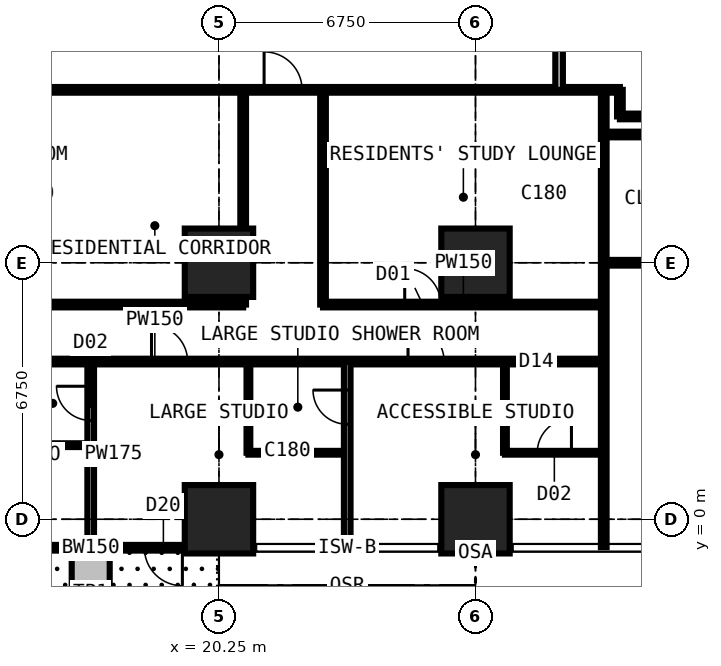
"""IFC4 building model, lengths in metres.
Left out: names, types, materials, properties, quantities, classifications, styles, units other than length and angle.
Written with IfcOpenShell. Run it as: python <this file> out.ifc"""

import sys

from ifc_helpers import new_model, si_unit, direction, frame, frame_2d, origin, origin_2d, place, context, subcontext, project, spatial, rectangle, extrude, element, fill, save


model = new_model("IFC4")
c1 = context("Model", 3, precision=1e-05, world=origin(), true_north=direction((0.0, 1.0)))
c2 = subcontext(c1, "Body", "Model", "MODEL_VIEW")
j1 = project(units=[si_unit("LENGTHUNIT", "METRE"), si_unit("PLANEANGLEUNIT", "RADIAN")], contexts=[c1])
p1 = place(None, origin())
s1 = spatial("IfcSite", under=j1, at=p1, CompositionType="ELEMENT")
p2 = place(p1, origin())
s2 = spatial("IfcBuilding", under=s1, at=p2, CompositionType="ELEMENT")
p3 = place(p2, frame((0.0, 0.0, 94.5)))
s3 = spatial("IfcBuildingStorey", under=s2, at=p3, CompositionType="ELEMENT", Elevation=94.5)
for number, where, z_axis, x_axis in (
    (1, (20.25, 0.0, 0.0), (0.0, 0.0, 1.0), (1.0, 0.0, 0.0)),
    (2, (20.25, 6.75, 0.0), (0.0, 0.0, 1.0), (1.0, 0.0, 0.0)),
    (3, (27.0, 0.0, 0.0), (0.0, 0.0, 1.0), (1.0, 0.0, 0.0)),
    (4, (27.0, 6.75, 0.0), (0.0, 0.0, 1.0), (1.0, 0.0, 0.0)),
):
    element("IfcColumn", number, at=place(p3, frame(where, z_axis=z_axis, x_axis=x_axis)), inside=s3, PredefinedType="COLUMN", context=c2, shape_type="SweptSolid", body=[
        extrude(rectangle(XDim=1.8, YDim=1.8, at=origin_2d()), origin(), (0.0, 0.0, 1.0), 3.6),
    ])
p4 = place(p3, frame((20.25, -0.75, 0.0), z_axis=(0.0, 0.0, 1.0), x_axis=(-1.0, 0.0, 0.0)))
e5 = element("IfcWall", 5, at=p4, inside=s3, PredefinedType="SOLIDWALL", context=c2, shape_type="SweptSolid", body=[
    extrude(rectangle(XDim=6.75, YDim=0.15, at=frame_2d((3.375, 0.0))), origin(), (0.0, 0.0, 1.0), 3.375),
])
p5 = place(p4, frame((0.962, 0.0, 0.0)))
e6 = element("IfcOpeningElement", 6, at=p5, cuts=e5, PredefinedType="OPENING", context=c2, shape_type="SweptSolid", body=[
    extrude(rectangle(XDim=1.0, YDim=2.2, at=frame_2d((0.5, 1.1))), frame((0.0, 0.085, 0.0), z_axis=(0.0, -1.0, 0.0), x_axis=(1.0, 0.0, 0.0)), (0.0, 0.0, 1.0), 0.17),
])
p6 = place(p4, frame((2.025, 0.0, 0.9)))
e7 = element("IfcOpeningElement", 7, at=p6, cuts=e5, PredefinedType="OPENING", context=c2, shape_type="SweptSolid", body=[
    extrude(rectangle(XDim=1.2, YDim=1.8, at=frame_2d((0.6, 0.9))), frame((0.0, 0.085, 0.0), z_axis=(0.0, -1.0, 0.0), x_axis=(1.0, 0.0, 0.0)), (0.0, 0.0, 1.0), 0.17),
])
p7 = place(p4, frame((4.788, 0.0, 0.0)))
e8 = element("IfcOpeningElement", 8, at=p7, cuts=e5, PredefinedType="OPENING", context=c2, shape_type="SweptSolid", body=[
    extrude(rectangle(XDim=1.0, YDim=2.2, at=frame_2d((0.5, 1.1))), frame((0.0, 0.085, 0.0), z_axis=(0.0, -1.0, 0.0), x_axis=(1.0, 0.0, 0.0)), (0.0, 0.0, 1.0), 0.17),
])
p8 = place(p4, frame((3.525, 0.0, 0.9)))
e9 = element("IfcOpeningElement", 9, at=p8, cuts=e5, PredefinedType="OPENING", context=c2, shape_type="SweptSolid", body=[
    extrude(rectangle(XDim=1.2, YDim=1.8, at=frame_2d((0.6, 0.9))), frame((0.0, 0.085, 0.0), z_axis=(0.0, -1.0, 0.0), x_axis=(1.0, 0.0, 0.0)), (0.0, 0.0, 1.0), 0.17),
])
p9 = place(p3, frame((16.875, -0.85, 0.0), z_axis=(0.0, 0.0, 1.0), x_axis=(0.0, -1.0, 0.0)))
e10 = element("IfcWall", 10, at=p9, inside=s3, PredefinedType="USERDEFINED", context=c2, shape_type="SweptSolid", body=[
    extrude(rectangle(XDim=2.2, YDim=1.0, at=frame_2d((1.1, 0.0))), origin(), (0.0, 0.0, 1.0), 0.9),
])
p10 = place(p3, frame((6.75, 4.15, 0.0), z_axis=(0.0, 0.0, 1.0), x_axis=(1.0, 0.0, 0.0)))
e11 = element("IfcWall", 11, at=p10, inside=s3, PredefinedType="PARTITIONING", context=c2, shape_type="SweptSolid", body=[
    extrude(rectangle(XDim=23.625, YDim=0.15, at=frame_2d((11.812, 0.0))), origin(), (0.0, 0.0, 1.0), 3.375),
])
p11 = place(p10, frame((2.85, 0.0, 0.0)))
e12 = element("IfcOpeningElement", 12, at=p11, cuts=e11, PredefinedType="OPENING", context=c2, shape_type="SweptSolid", body=[
    extrude(rectangle(XDim=1.0, YDim=2.2, at=frame_2d((0.5, 1.1))), frame((0.0, 0.085, 0.0), z_axis=(0.0, -1.0, 0.0), x_axis=(1.0, 0.0, 0.0)), (0.0, 0.0, 1.0), 0.17),
])
p12 = place(p10, frame((18.475, 0.0, 0.0)))
e13 = element("IfcOpeningElement", 13, at=p12, cuts=e11, PredefinedType="OPENING", context=c2, shape_type="SweptSolid", body=[
    extrude(rectangle(XDim=0.95, YDim=2.2, at=frame_2d((0.475, 1.1))), frame((0.0, 0.085, 0.0), z_axis=(0.0, -1.0, 0.0), x_axis=(1.0, 0.0, 0.0)), (0.0, 0.0, 1.0), 0.17),
])
p13 = place(p10, frame((11.725, 0.0, 0.0)))
e14 = element("IfcOpeningElement", 14, at=p13, cuts=e11, PredefinedType="OPENING", context=c2, shape_type="SweptSolid", body=[
    extrude(rectangle(XDim=0.95, YDim=2.2, at=frame_2d((0.475, 1.1))), frame((0.0, 0.085, 0.0), z_axis=(0.0, -1.0, 0.0), x_axis=(1.0, 0.0, 0.0)), (0.0, 0.0, 1.0), 0.17),
])
p14 = place(p10, frame((6.95, 0.0, 0.0)))
e15 = element("IfcOpeningElement", 15, at=p14, cuts=e11, PredefinedType="OPENING", context=c2, shape_type="SweptSolid", body=[
    extrude(rectangle(XDim=0.95, YDim=2.2, at=frame_2d((0.475, 1.1))), frame((0.0, 0.085, 0.0), z_axis=(0.0, -1.0, 0.0), x_axis=(1.0, 0.0, 0.0)), (0.0, 0.0, 1.0), 0.17),
])
p15 = place(p3, frame((6.75, 5.65, 0.0), z_axis=(0.0, 0.0, 1.0), x_axis=(1.0, 0.0, 0.0)))
e16 = element("IfcWall", 16, at=p15, inside=s3, PredefinedType="PARTITIONING", context=c2, shape_type="SweptSolid", body=[
    extrude(rectangle(XDim=14.137, YDim=0.15, at=frame_2d((7.069, 0.0))), origin(), (0.0, 0.0, 1.0), 3.375),
])
p16 = place(p15, frame((7.7, 0.0, 0.0)))
e17 = element("IfcOpeningElement", 17, at=p16, cuts=e16, PredefinedType="OPENING", context=c2, shape_type="SweptSolid", body=[
    extrude(rectangle(XDim=0.95, YDim=2.2, at=frame_2d((0.475, 1.1))), frame((0.0, 0.085, 0.0), z_axis=(0.0, -1.0, 0.0), x_axis=(1.0, 0.0, 0.0)), (0.0, 0.0, 1.0), 0.17),
])
p17 = place(p3, frame((10.125, 11.3, 0.0), z_axis=(0.0, 0.0, 1.0), x_axis=(1.0, 0.0, 0.0)))
e18 = element("IfcWall", 18, at=p17, inside=s3, PredefinedType="PARTITIONING", context=c2, shape_type="SweptSolid", body=[
    extrude(rectangle(XDim=20.675, YDim=0.15, at=frame_2d((10.337, 0.0))), origin(), (0.0, 0.0, 1.0), 3.375),
])
p18 = place(p17, frame((11.312, 0.0, 0.0)))
e19 = element("IfcOpeningElement", 19, at=p18, cuts=e18, PredefinedType="OPENING", context=c2, shape_type="SweptSolid", body=[
    extrude(rectangle(XDim=1.0, YDim=2.2, at=frame_2d((0.5, 1.1))), frame((0.0, 0.085, 0.0), z_axis=(0.0, -1.0, 0.0), x_axis=(1.0, 0.0, 0.0)), (0.0, 0.0, 1.0), 0.17),
])
p19 = place(p3, frame((14.875, 1.95, 0.0), z_axis=(0.0, 0.0, 1.0), x_axis=(1.0, 0.0, 0.0)))
e20 = element("IfcWall", 20, at=p19, inside=s3, PredefinedType="PARTITIONING", context=c2, shape_type="SweptSolid", body=[
    extrude(rectangle(XDim=2.0, YDim=0.1, at=frame_2d((1.0, 0.0))), origin(), (0.0, 0.0, 1.0), 3.375),
])
p20 = place(p3, frame((16.875, -0.734, 0.0), z_axis=(0.0, 0.0, 1.0), x_axis=(0.0, 1.0, 0.0)))
e21 = element("IfcWall", 21, at=p20, inside=s3, PredefinedType="PARTITIONING", context=c2, shape_type="SweptSolid", body=[
    extrude(rectangle(XDim=4.884, YDim=0.175, at=frame_2d((2.442, 0.0))), origin(), (0.0, 0.0, 1.0), 3.375),
])
p21 = place(p20, frame((3.334, 0.0, 0.0)))
e22 = element("IfcOpeningElement", 22, at=p21, cuts=e21, PredefinedType="OPENING", context=c2, shape_type="SweptSolid", body=[
    extrude(rectangle(XDim=0.9, YDim=2.2, at=frame_2d((0.45, 1.1))), frame((0.0, 0.097, 0.0), z_axis=(0.0, -1.0, 0.0), x_axis=(1.0, 0.0, 0.0)), (0.0, 0.0, 1.0), 0.195),
])
p22 = place(p3, frame((20.887, 5.65, 0.0), z_axis=(0.0, 0.0, 1.0), x_axis=(0.0, 1.0, 0.0)))
e23 = element("IfcWall", 23, at=p22, inside=s3, PredefinedType="PARTITIONING", context=c2, shape_type="SweptSolid", body=[
    extrude(rectangle(XDim=5.65, YDim=0.15, at=frame_2d((2.825, 0.0))), origin(), (0.0, 0.0, 1.0), 3.375),
])
p23 = place(p3, frame((21.025, 1.75, 0.0), z_axis=(0.0, 0.0, 1.0), x_axis=(0.0, 1.0, 0.0)))
e24 = element("IfcWall", 24, at=p23, inside=s3, PredefinedType="PARTITIONING", context=c2, shape_type="SweptSolid", body=[
    extrude(rectangle(XDim=2.4, YDim=0.1, at=frame_2d((1.2, 0.0))), origin(), (0.0, 0.0, 1.0), 3.375),
])
p24 = place(p3, frame((21.025, 1.75, 0.0), z_axis=(0.0, 0.0, 1.0), x_axis=(1.0, 0.0, 0.0)))
e25 = element("IfcWall", 25, at=p24, inside=s3, PredefinedType="PARTITIONING", context=c2, shape_type="SweptSolid", body=[
    extrude(rectangle(XDim=2.6, YDim=0.1, at=frame_2d((1.3, 0.0))), origin(), (0.0, 0.0, 1.0), 3.375),
])
p25 = place(p3, frame((22.988, 5.65, 0.0), z_axis=(0.0, 0.0, 1.0), x_axis=(1.0, 0.0, 0.0)))
e26 = element("IfcWall", 26, at=p25, inside=s3, PredefinedType="PARTITIONING", context=c2, shape_type="SweptSolid", body=[
    extrude(rectangle(XDim=7.387, YDim=0.15, at=frame_2d((3.694, 0.0))), origin(), (0.0, 0.0, 1.0), 3.375),
])
p26 = place(p25, frame((2.15, 0.0, 0.0)))
e27 = element("IfcOpeningElement", 27, at=p26, cuts=e26, PredefinedType="OPENING", context=c2, shape_type="SweptSolid", body=[
    extrude(rectangle(XDim=0.95, YDim=2.2, at=frame_2d((0.475, 1.1))), frame((0.0, 0.085, 0.0), z_axis=(0.0, -1.0, 0.0), x_axis=(1.0, 0.0, 0.0)), (0.0, 0.0, 1.0), 0.17),
])
p27 = place(p3, frame((22.988, 5.65, 0.0), z_axis=(0.0, 0.0, 1.0), x_axis=(0.0, 1.0, 0.0)))
e28 = element("IfcWall", 28, at=p27, inside=s3, PredefinedType="PARTITIONING", context=c2, shape_type="SweptSolid", body=[
    extrude(rectangle(XDim=5.65, YDim=0.15, at=frame_2d((2.825, 0.0))), origin(), (0.0, 0.0, 1.0), 3.375),
])
p28 = place(p3, frame((23.625, -0.734, 0.0), z_axis=(0.0, 0.0, 1.0), x_axis=(0.0, 1.0, 0.0)))
e29 = element("IfcWall", 29, at=p28, inside=s3, PredefinedType="PARTITIONING", context=c2, shape_type="SweptSolid", body=[
    extrude(rectangle(XDim=4.884, YDim=0.175, at=frame_2d((2.442, 0.0))), origin(), (0.0, 0.0, 1.0), 3.375),
])
p29 = place(p28, frame((3.234, 0.0, 0.0)))
e30 = element("IfcOpeningElement", 30, at=p29, cuts=e29, PredefinedType="OPENING", context=c2, shape_type="SweptSolid", body=[
    extrude(rectangle(XDim=0.9, YDim=2.2, at=frame_2d((0.45, 1.1))), frame((0.0, 0.097, 0.0), z_axis=(0.0, -1.0, 0.0), x_axis=(1.0, 0.0, 0.0)), (0.0, 0.0, 1.0), 0.195),
])
p30 = place(p3, frame((27.775, 1.75, 0.0), z_axis=(0.0, 0.0, 1.0), x_axis=(0.0, 1.0, 0.0)))
e31 = element("IfcWall", 31, at=p30, inside=s3, PredefinedType="PARTITIONING", context=c2, shape_type="SweptSolid", body=[
    extrude(rectangle(XDim=2.4, YDim=0.1, at=frame_2d((1.2, 0.0))), origin(), (0.0, 0.0, 1.0), 3.375),
])
p31 = place(p3, frame((27.775, 1.75, 0.0), z_axis=(0.0, 0.0, 1.0), x_axis=(1.0, 0.0, 0.0)))
e32 = element("IfcWall", 32, at=p31, inside=s3, PredefinedType="PARTITIONING", context=c2, shape_type="SweptSolid", body=[
    extrude(rectangle(XDim=2.6, YDim=0.1, at=frame_2d((1.3, 0.0))), origin(), (0.0, 0.0, 1.0), 3.375),
])
p32 = place(p31, frame((0.85, 0.0, 0.0)))
e33 = element("IfcOpeningElement", 33, at=p32, cuts=e32, PredefinedType="OPENING", context=c2, shape_type="SweptSolid", body=[
    extrude(rectangle(XDim=0.9, YDim=2.2, at=frame_2d((0.45, 1.1))), frame((0.0, 0.06, 0.0), z_axis=(0.0, -1.0, 0.0), x_axis=(1.0, 0.0, 0.0)), (0.0, 0.0, 1.0), 0.12),
])
p33 = place(p3, frame((29.2, 11.3, 0.0), z_axis=(0.0, 0.0, 1.0), x_axis=(0.0, 1.0, 0.0)))
e34 = element("IfcWall", 34, at=p33, inside=s3, PredefinedType="PARTITIONING", context=c2, shape_type="SweptSolid", body=[
    extrude(rectangle(XDim=17.9, YDim=0.2, at=frame_2d((8.95, 0.0))), origin(), (0.0, 0.0, 1.0), 3.375),
])
p34 = place(p33, frame((8.35, 0.0, 0.0)))
e35 = element("IfcOpeningElement", 35, at=p34, cuts=e34, PredefinedType="OPENING", context=c2, shape_type="SweptSolid", body=[
    extrude(rectangle(XDim=1.2, YDim=2.2, at=frame_2d((0.6, 1.1))), frame((0.0, 0.11, 0.0), z_axis=(0.0, -1.0, 0.0), x_axis=(1.0, 0.0, 0.0)), (0.0, 0.0, 1.0), 0.22),
])
p35 = place(p3, frame((30.375, -0.734, 0.0), z_axis=(0.0, 0.0, 1.0), x_axis=(0.0, 1.0, 0.0)))
e36 = element("IfcWall", 36, at=p35, inside=s3, PredefinedType="PARTITIONING", context=c2, shape_type="SweptSolid", body=[
    extrude(rectangle(XDim=12.034, YDim=0.15, at=frame_2d((6.017, 0.0))), origin(), (0.0, 0.0, 1.0), 3.375),
])
p36 = place(p3, frame((30.375, 6.75, 0.0), z_axis=(0.0, 0.0, 1.0), x_axis=(1.0, 0.0, 0.0)))
e37 = element("IfcWall", 37, at=p36, inside=s3, PredefinedType="PARTITIONING", context=c2, shape_type="SweptSolid", body=[
    extrude(rectangle(XDim=10.859, YDim=0.15, at=frame_2d((5.429, 0.0))), origin(), (0.0, 0.0, 1.0), 2.877),
])
p37 = place(p36, frame((1.45, 0.0, 0.0)))
e38 = element("IfcOpeningElement", 38, at=p37, cuts=e37, PredefinedType="OPENING", context=c2, shape_type="SweptSolid", body=[
    extrude(rectangle(XDim=1.0, YDim=2.2, at=frame_2d((0.5, 1.1))), frame((0.0, 0.085, 0.0), z_axis=(0.0, -1.0, 0.0), x_axis=(1.0, 0.0, 0.0)), (0.0, 0.0, 1.0), 0.17),
])
p38 = place(p3, frame((30.375, 10.125, 0.0), z_axis=(0.0, 0.0, 1.0), x_axis=(1.0, 0.0, 0.0)))
e39 = element("IfcWall", 39, at=p38, inside=s3, PredefinedType="PARTITIONING", context=c2, shape_type="SweptSolid", body=[
    extrude(rectangle(XDim=10.859, YDim=0.15, at=frame_2d((5.429, 0.0))), origin(), (0.0, 0.0, 1.0), 3.375),
])
p39 = place(p38, frame((2.5, 0.0, 0.0)))
e40 = element("IfcOpeningElement", 40, at=p39, cuts=e39, PredefinedType="OPENING", context=c2, shape_type="SweptSolid", body=[
    extrude(rectangle(XDim=1.0, YDim=2.2, at=frame_2d((0.5, 1.1))), frame((0.0, 0.085, 0.0), z_axis=(0.0, -1.0, 0.0), x_axis=(1.0, 0.0, 0.0)), (0.0, 0.0, 1.0), 0.17),
])
p40 = place(p3, frame((30.8, 10.6, 0.0), z_axis=(0.0, 0.0, 1.0), x_axis=(0.0, 1.0, 0.0)))
e41 = element("IfcWall", 41, at=p40, inside=s3, PredefinedType="PARTITIONING", context=c2, shape_type="SweptSolid", body=[
    extrude(rectangle(XDim=0.7, YDim=0.15, at=frame_2d((0.35, 0.0))), origin(), (0.0, 0.0, 1.0), 3.375),
])
p41 = place(p3, frame((30.8, 10.6, 0.0), z_axis=(0.0, 0.0, 1.0), x_axis=(1.0, 0.0, 0.0)))
e42 = element("IfcWall", 42, at=p41, inside=s3, PredefinedType="PARTITIONING", context=c2, shape_type="SweptSolid", body=[
    extrude(rectangle(XDim=1.85, YDim=0.15, at=frame_2d((0.925, 0.0))), origin(), (0.0, 0.0, 1.0), 3.375),
])
p42 = place(p5, origin())
e43 = element("IfcDoor", 43, at=p42, inside=s3, OperationType="SINGLE_SWING_LEFT", PredefinedType="DOOR", context=c2, shape_type="SweptSolid", body=[
    extrude(rectangle(XDim=1.0, YDim=2.2, at=frame_2d((0.5, 1.1))), frame((0.0, 0.025, 0.0), z_axis=(0.0, -1.0, 0.0), x_axis=(1.0, 0.0, 0.0)), (0.0, 0.0, 1.0), 0.05),
])
fill(e6, e43)
p43 = place(p6, origin())
e44 = element("IfcWindow", 44, at=p43, inside=s3, PartitioningType="SINGLE_PANEL", PredefinedType="WINDOW", context=c2, shape_type="SweptSolid", body=[
    extrude(rectangle(XDim=1.2, YDim=1.8, at=frame_2d((0.6, 0.9))), frame((0.0, 0.03, 0.0), z_axis=(0.0, -1.0, 0.0), x_axis=(1.0, 0.0, 0.0)), (0.0, 0.0, 1.0), 0.06),
])
fill(e7, e44)
p44 = place(p8, origin())
e45 = element("IfcWindow", 45, at=p44, inside=s3, PartitioningType="SINGLE_PANEL", PredefinedType="WINDOW", context=c2, shape_type="SweptSolid", body=[
    extrude(rectangle(XDim=1.2, YDim=1.8, at=frame_2d((0.6, 0.9))), frame((0.0, 0.03, 0.0), z_axis=(0.0, -1.0, 0.0), x_axis=(1.0, 0.0, 0.0)), (0.0, 0.0, 1.0), 0.06),
])
fill(e9, e45)
p45 = place(p12, origin())
e46 = element("IfcDoor", 46, at=p45, inside=s3, OperationType="SINGLE_SWING_LEFT", PredefinedType="DOOR", context=c2, shape_type="SweptSolid", body=[
    extrude(rectangle(XDim=0.95, YDim=2.2, at=frame_2d((0.475, 1.1))), frame((0.0, 0.025, 0.0), z_axis=(0.0, -1.0, 0.0), x_axis=(1.0, 0.0, 0.0)), (0.0, 0.0, 1.0), 0.05),
])
fill(e13, e46)
p46 = place(p32, origin())
e47 = element("IfcDoor", 47, at=p46, inside=s3, OperationType="SINGLE_SWING_RIGHT", PredefinedType="DOOR", context=c2, shape_type="SweptSolid", body=[
    extrude(rectangle(XDim=0.9, YDim=2.2, at=frame_2d((0.45, 1.1))), frame((0.0, 0.025, 0.0), z_axis=(0.0, -1.0, 0.0), x_axis=(1.0, 0.0, 0.0)), (0.0, 0.0, 1.0), 0.05),
])
fill(e33, e47)
p47 = place(p13, origin())
e48 = element("IfcDoor", 48, at=p47, inside=s3, OperationType="SINGLE_SWING_LEFT", PredefinedType="DOOR", context=c2, shape_type="SweptSolid", body=[
    extrude(rectangle(XDim=0.95, YDim=2.2, at=frame_2d((0.475, 1.1))), frame((0.0, 0.025, 0.0), z_axis=(0.0, -1.0, 0.0), x_axis=(1.0, 0.0, 0.0)), (0.0, 0.0, 1.0), 0.05),
])
fill(e14, e48)
p48 = place(p29, origin())
e49 = element("IfcDoor", 49, at=p48, inside=s3, OperationType="SINGLE_SWING_RIGHT", PredefinedType="DOOR", context=c2, shape_type="SweptSolid", body=[
    extrude(rectangle(XDim=0.9, YDim=2.2, at=frame_2d((0.45, 1.1))), frame((0.0, 0.025, 0.0), z_axis=(0.0, -1.0, 0.0), x_axis=(1.0, 0.0, 0.0)), (0.0, 0.0, 1.0), 0.05),
])
fill(e30, e49)
p49 = place(p21, origin())
e50 = element("IfcDoor", 50, at=p49, inside=s3, OperationType="SINGLE_SWING_RIGHT", PredefinedType="DOOR", context=c2, shape_type="SweptSolid", body=[
    extrude(rectangle(XDim=0.9, YDim=2.2, at=frame_2d((0.45, 1.1))), frame((0.0, 0.025, 0.0), z_axis=(0.0, -1.0, 0.0), x_axis=(1.0, 0.0, 0.0)), (0.0, 0.0, 1.0), 0.05),
])
fill(e22, e50)
p50 = place(p18, origin())
e51 = element("IfcDoor", 51, at=p50, inside=s3, OperationType="SINGLE_SWING_LEFT", PredefinedType="DOOR", context=c2, shape_type="SweptSolid", body=[
    extrude(rectangle(XDim=1.0, YDim=2.2, at=frame_2d((0.5, 1.1))), frame((0.0, 0.025, 0.0), z_axis=(0.0, -1.0, 0.0), x_axis=(1.0, 0.0, 0.0)), (0.0, 0.0, 1.0), 0.05),
])
fill(e19, e51)
p51 = place(p26, origin())
e52 = element("IfcDoor", 52, at=p51, inside=s3, OperationType="SINGLE_SWING_LEFT", PredefinedType="DOOR", context=c2, shape_type="SweptSolid", body=[
    extrude(rectangle(XDim=0.95, YDim=2.2, at=frame_2d((0.475, 1.1))), frame((0.0, 0.025, 0.0), z_axis=(0.0, -1.0, 0.0), x_axis=(1.0, 0.0, 0.0)), (0.0, 0.0, 1.0), 0.05),
])
fill(e27, e52)
save(model, sys.argv[1])
